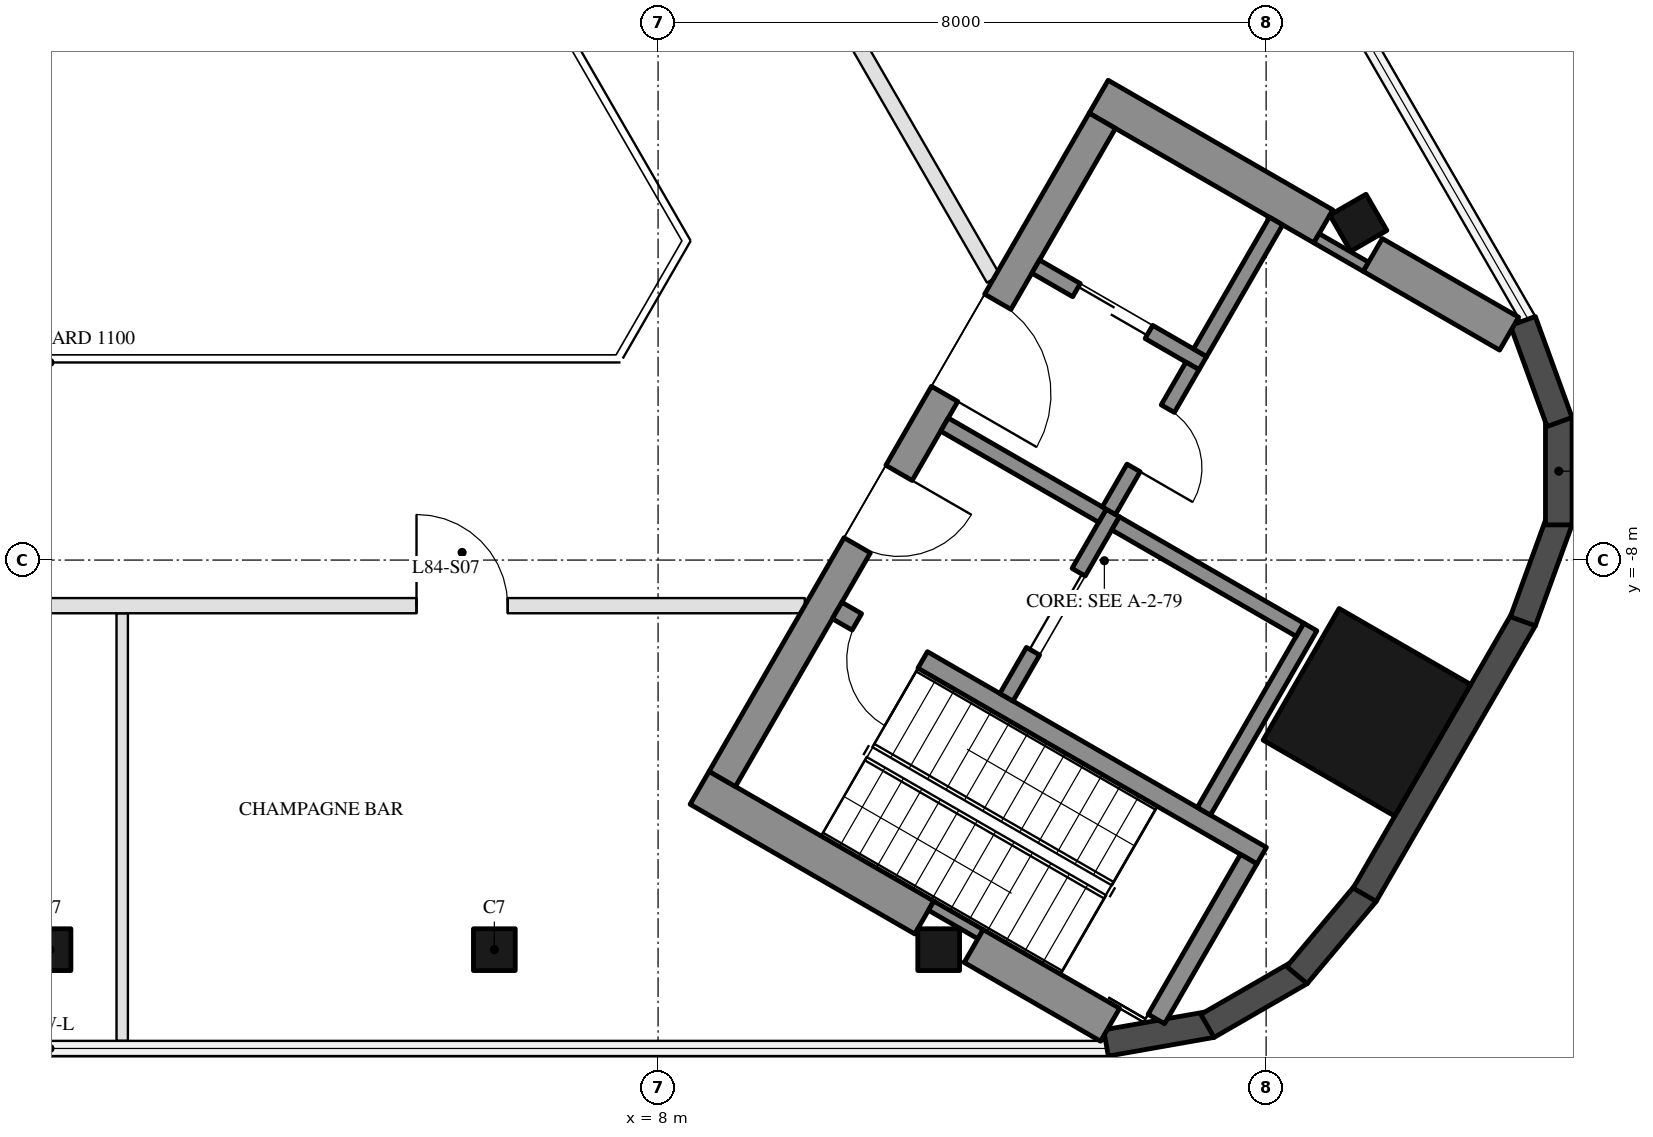
"""IFC4 building model, lengths in metres.
Left out: names, types, materials, properties, quantities, classifications, styles, units other than length and angle.
Written with IfcOpenShell. Run it as: python <this file> out.ifc"""

import sys

from ifc_helpers import new_model, si_unit, direction, frame, frame_2d, origin, origin_2d, place, context, subcontext, project, spatial, rectangle, hollow_rectangle, extrude, boolean, halfspace, element, fill, save


model = new_model("IFC4")
c1 = context("Model", 3, precision=1e-05, world=origin(), true_north=direction((0.0, 1.0)))
c2 = subcontext(c1, "Body", "Model", "MODEL_VIEW")
j1 = project(units=[si_unit("LENGTHUNIT", "METRE"), si_unit("PLANEANGLEUNIT", "RADIAN")], contexts=[c1])
p1 = place(None, origin())
s1 = spatial("IfcSite", under=j1, at=p1, CompositionType="ELEMENT")
p2 = place(p1, origin())
s2 = spatial("IfcBuilding", under=s1, at=p2, CompositionType="ELEMENT")
p3 = place(p2, frame((0.0, 0.0, 338.3)))
s3 = spatial("IfcBuildingStorey", under=s2, at=p3, CompositionType="ELEMENT", Elevation=338.3)
p4 = place(p3, frame((0.0, -13.126, 0.0), z_axis=(0.0, 0.0, 1.0), x_axis=(-1.0, 0.0, 0.0)))
e1 = element("IfcColumn", 1, at=p4, inside=s3, PredefinedType="COLUMN", context=c2, shape_type="SweptSolid", body=[
    boolean("DIFFERENCE", extrude(hollow_rectangle(XDim=0.55, YDim=0.55, WallThickness=0.025, at=origin_2d()), origin(), (0.0, 0.0, 1.0), 5.0), halfspace(frame((0.0, 0.0, 0.019), z_axis=(0.0, 0.0, 1.0), x_axis=(1.0, 0.0, 0.0)), True)),
])
p5 = place(p3, frame((5.846, -13.126, 0.0), z_axis=(0.0, 0.0, 1.0), x_axis=(-1.0, 0.0, 0.0)))
e2 = element("IfcColumn", 2, at=p5, inside=s3, PredefinedType="COLUMN", context=c2, shape_type="SweptSolid", body=[
    boolean("DIFFERENCE", extrude(hollow_rectangle(XDim=0.55, YDim=0.55, WallThickness=0.025, at=origin_2d()), origin(), (0.0, 0.0, 1.0), 5.0), halfspace(frame((0.0, 0.0, 0.02), z_axis=(0.0, 0.0, 1.0), x_axis=(1.0, 0.0, 0.0)), True)),
])
for number, where, z_axis, x_axis in (
    (3, (11.692, -13.126, 0.0), (0.0, 0.0, 1.0), (-1.0, 0.0, 0.0)),
    (4, (17.214, -3.562, 0.0), (0.0, 0.0, 1.0), (-0.5, 0.866, 0.0)),
):
    element("IfcColumn", number, at=place(p3, frame(where, z_axis=z_axis, x_axis=x_axis)), inside=s3, PredefinedType="COLUMN", context=c2, shape_type="SweptSolid", body=[
        boolean("DIFFERENCE", extrude(hollow_rectangle(XDim=0.55, YDim=0.55, WallThickness=0.025, at=origin_2d()), origin(), (0.0, 0.0, 1.0), 5.0), halfspace(frame((0.0, 0.0, 0.024), z_axis=(0.0, 0.0, 1.0), x_axis=(1.0, 0.0, 0.0)), True)),
    ])
p6 = place(p3, frame((17.326, -10.003, 0.0), z_axis=(0.0, 0.0, 1.0), x_axis=(0.5, 0.866025403784, 0.0)))
e5 = element("IfcColumn", 5, at=p6, inside=s3, PredefinedType="COLUMN", context=c2, shape_type="SweptSolid", body=[
    boolean("DIFFERENCE", extrude(hollow_rectangle(XDim=2.0, YDim=2.0, WallThickness=0.05, at=origin_2d()), origin(), (0.0, 0.0, 1.0), 5.0), halfspace(frame((0.0, 0.0, 0.066), z_axis=(0.0, 0.0, 1.0), x_axis=(1.0, 0.0, 0.0)), True)),
])
for number, where, z_axis, x_axis in (
    (6, (13.893, -14.354, 0.0), (0.0, 0.0, 1.0), (0.985, 0.174, 0.0)),
    (7, (15.228, -14.129, 0.0), (0.0, 0.0, 1.0), (0.866, 0.5, 0.0)),
    (8, (16.406, -13.461, 0.0), (0.0, 0.0, 1.0), (0.643, 0.766, 0.0)),
):
    element("IfcWall", number, at=place(p3, frame(where, z_axis=z_axis, x_axis=x_axis)), inside=s3, PredefinedType="SOLIDWALL", context=c2, shape_type="SweptSolid", body=[
        extrude(rectangle(XDim=1.414, YDim=0.35, at=frame_2d((0.707, 0.0))), origin(), (0.0, 0.0, 1.0), 4.8),
    ])
p7 = place(p3, frame((17.297, -12.404, 0.0), z_axis=(0.0, 0.0, 1.0), x_axis=(0.499983227221, 0.866035087336, 0.0)))
e9 = element("IfcWall", 9, at=p7, inside=s3, PredefinedType="SOLIDWALL", context=c2, shape_type="SweptSolid", body=[
    extrude(rectangle(XDim=4.187, YDim=0.35, at=frame_2d((2.094, 0.0))), origin(), (0.0, 0.0, 1.0), 4.8),
])
p8 = place(p3, frame((19.377, -8.805, 0.0), z_axis=(0.0, 0.0, 1.0), x_axis=(0.341964928618, 0.939712715459, 0.0)))
e10 = element("IfcWall", 10, at=p8, inside=s3, PredefinedType="SOLIDWALL", context=c2, shape_type="SweptSolid", body=[
    extrude(rectangle(XDim=1.414, YDim=0.35, at=frame_2d((0.707, 0.0))), origin(), (0.0, 0.0, 1.0), 4.8),
])
p9 = place(p3, frame((19.85, -7.537, 0.0), z_axis=(0.0, 0.0, 1.0), x_axis=(0.0, 1.0, 0.0)))
e11 = element("IfcWall", 11, at=p9, inside=s3, PredefinedType="SOLIDWALL", context=c2, shape_type="SweptSolid", body=[
    extrude(rectangle(XDim=1.413, YDim=0.35, at=frame_2d((0.707, 0.0))), origin(), (0.0, 0.0, 1.0), 4.8),
])
p10 = place(p3, frame((19.861, -6.183, 0.0), z_axis=(0.0, 0.0, 1.0), x_axis=(-0.341964928618, 0.939712715459, 0.0)))
e12 = element("IfcWall", 12, at=p10, inside=s3, PredefinedType="SOLIDWALL", context=c2, shape_type="SweptSolid", body=[
    extrude(rectangle(XDim=1.414, YDim=0.35, at=frame_2d((0.707, 0.0))), origin(), (0.0, 0.0, 1.0), 4.8),
])
p11 = place(p3, frame((8.547, -10.997, 0.0), z_axis=(0.0, 0.0, 1.0), x_axis=(0.866024775297, -0.500001088571, 0.0)))
e13 = element("IfcWall", 13, at=p11, inside=s3, PredefinedType="SHEAR", context=c2, shape_type="SweptSolid", body=[
    extrude(rectangle(XDim=3.413, YDim=0.5, at=frame_2d((1.707, 0.0))), origin(), (0.0, 0.0, 1.0), 4.8),
])
p12 = place(p3, frame((11.593, -12.547, 0.0), z_axis=(0.0, 0.0, 1.0), x_axis=(0.866115239748, -0.499844367254, 0.0)))
e14 = element("IfcWall", 14, at=p12, inside=s3, PredefinedType="SHEAR", context=c2, shape_type="SweptSolid", body=[
    extrude(rectangle(XDim=0.751, YDim=0.14, at=frame_2d((0.375, 0.0))), origin(), (0.0, 0.0, 1.0), 4.8),
])
p13 = place(p3, frame((12.153, -13.079, 0.0), z_axis=(0.0, 0.0, 1.0), x_axis=(0.866044274939, -0.499967312778, 0.0)))
e15 = element("IfcWall", 15, at=p13, inside=s3, PredefinedType="SHEAR", context=c2, shape_type="SweptSolid", body=[
    extrude(rectangle(XDim=2.072, YDim=0.5, at=frame_2d((1.036, 0.0))), origin(), (0.0, 0.0, 1.0), 4.8),
])
p14 = place(p3, frame((13.797, -1.903, 0.0), z_axis=(0.0, 0.0, 1.0), x_axis=(0.866024775297, -0.500001088571, 0.0)))
e16 = element("IfcWall", 16, at=p14, inside=s3, PredefinedType="SHEAR", context=c2, shape_type="SweptSolid", body=[
    extrude(rectangle(XDim=3.413, YDim=0.5, at=frame_2d((1.707, 0.0))), origin(), (0.0, 0.0, 1.0), 4.8),
])
p15 = place(p3, frame((16.663, -3.766, 0.0), z_axis=(0.0, 0.0, 1.0), x_axis=(0.86603400694, -0.499985098601, 0.0)))
e17 = element("IfcWall", 17, at=p15, inside=s3, PredefinedType="SHEAR", context=c2, shape_type="SweptSolid", body=[
    extrude(rectangle(XDim=0.751, YDim=0.14, at=frame_2d((0.375, 0.0))), origin(), (0.0, 0.0, 1.0), 4.8),
])
p16 = place(p3, frame((17.403, -3.986, 0.0), z_axis=(0.0, 0.0, 1.0), x_axis=(0.866044274939, -0.499967312778, 0.0)))
e18 = element("IfcWall", 18, at=p16, inside=s3, PredefinedType="SHEAR", context=c2, shape_type="SweptSolid", body=[
    extrude(rectangle(XDim=2.072, YDim=0.5, at=frame_2d((1.036, 0.0))), origin(), (0.0, 0.0, 1.0), 4.8),
])
p17 = place(p3, frame((8.845, -10.88, 0.0), z_axis=(0.0, 0.0, 1.0), x_axis=(0.500004234368, 0.866022959057, 0.0)))
e19 = element("IfcWall", 19, at=p17, inside=s3, PredefinedType="SHEAR", context=c2, shape_type="SweptSolid", body=[
    extrude(rectangle(XDim=10.0, YDim=0.4, at=frame_2d((5.0, 0.0))), origin(), (0.0, 0.0, 1.0), 4.8),
])
p18 = place(p17, frame((3.55, 0.0, 0.0)))
e20 = element("IfcOpeningElement", 20, at=p18, cuts=e19, PredefinedType="OPENING", context=c2, shape_type="SweptSolid", body=[
    extrude(rectangle(XDim=1.1, YDim=2.1, at=frame_2d((0.55, 1.05))), frame((0.0, 0.21, 0.0), z_axis=(0.0, -1.0, 0.0), x_axis=(1.0, 0.0, 0.0)), (0.0, 0.0, 1.0), 0.42),
])
p19 = place(p17, frame((5.85, 0.0, 0.0)))
e21 = element("IfcOpeningElement", 21, at=p19, cuts=e19, PredefinedType="OPENING", context=c2, shape_type="SweptSolid", body=[
    extrude(rectangle(XDim=1.4, YDim=2.1, at=frame_2d((0.7, 1.05))), frame((0.0, 0.21, 0.0), z_axis=(0.0, -1.0, 0.0), x_axis=(1.0, 0.0, 0.0)), (0.0, 0.0, 1.0), 0.42),
])
p20 = place(p3, frame((10.356, -8.664, 0.0), z_axis=(0.0, 0.0, 1.0), x_axis=(0.866028629588, -0.499994412703, 0.0)))
e22 = element("IfcWall", 22, at=p20, inside=s3, PredefinedType="SHEAR", context=c2, shape_type="SweptSolid", body=[
    extrude(rectangle(XDim=6.45, YDim=0.25, at=frame_2d((3.225, 0.0))), origin(), (0.0, 0.0, 1.0), 4.8),
])
p21 = place(p20, frame((0.3, 0.0, 0.0)))
e23 = element("IfcOpeningElement", 23, at=p21, cuts=e22, PredefinedType="OPENING", context=c2, shape_type="SweptSolid", body=[
    extrude(rectangle(XDim=1.0, YDim=2.1, at=frame_2d((0.5, 1.05))), frame((0.0, 0.135, 0.0), z_axis=(0.0, -1.0, 0.0), x_axis=(1.0, 0.0, 0.0)), (0.0, 0.0, 1.0), 0.27),
])
p22 = place(p3, frame((14.556, -14.039, 0.0), z_axis=(0.0, 0.0, 1.0), x_axis=(0.500018134935, 0.866014933322, 0.0)))
e24 = element("IfcWall", 24, at=p22, inside=s3, PredefinedType="SHEAR", context=c2, shape_type="SweptSolid", body=[
    extrude(rectangle(XDim=2.43, YDim=0.25, at=frame_2d((1.215, 0.0))), origin(), (0.0, 0.0, 1.0), 4.8),
])
p23 = place(p3, frame((15.181, -11.305, 0.0), z_axis=(0.0, 0.0, 1.0), x_axis=(0.49994636267, 0.866056369097, 0.0)))
e25 = element("IfcWall", 25, at=p23, inside=s3, PredefinedType="SHEAR", context=c2, shape_type="SweptSolid", body=[
    extrude(rectangle(XDim=2.8, YDim=0.2, at=frame_2d((1.4, 0.0))), origin(), (0.0, 0.0, 1.0), 4.8),
])
p24 = place(p3, frame((12.583, -9.805, 0.0), z_axis=(0.0, 0.0, 1.0), x_axis=(0.49994636267, 0.866056369097, 0.0)))
e26 = element("IfcWall", 26, at=p24, inside=s3, PredefinedType="SHEAR", context=c2, shape_type="SweptSolid", body=[
    extrude(rectangle(XDim=2.8, YDim=0.2, at=frame_2d((1.4, 0.0))), origin(), (0.0, 0.0, 1.0), 4.8),
])
p25 = place(p24, frame((0.7, 0.0, 0.0)))
e27 = element("IfcOpeningElement", 27, at=p25, cuts=e26, PredefinedType="OPENING", context=c2, shape_type="SweptSolid", body=[
    extrude(rectangle(XDim=1.2, YDim=2.1, at=frame_2d((0.6, 1.05))), frame((0.0, 0.11, 0.0), z_axis=(0.0, -1.0, 0.0), x_axis=(1.0, 0.0, 0.0)), (0.0, 0.0, 1.0), 0.22),
])
p26 = place(p3, frame((11.768, -6.217, 0.0), z_axis=(0.0, 0.0, 1.0), x_axis=(0.866050077142, -0.499957262057, 0.0)))
e28 = element("IfcWall", 28, at=p26, inside=s3, PredefinedType="SHEAR", context=c2, shape_type="SweptSolid", body=[
    extrude(rectangle(XDim=2.4, YDim=0.2, at=frame_2d((1.2, 0.0))), origin(), (0.0, 0.0, 1.0), 4.8),
])
p27 = place(p3, frame((14.02, -7.517, 0.0), z_axis=(0.0, 0.0, 1.0), x_axis=(0.866034573852, -0.49998411664, 0.0)))
e29 = element("IfcWall", 29, at=p27, inside=s3, PredefinedType="SHEAR", context=c2, shape_type="SweptSolid", body=[
    extrude(rectangle(XDim=2.8, YDim=0.2, at=frame_2d((1.4, 0.0))), origin(), (0.0, 0.0, 1.0), 4.8),
])
p28 = place(p3, frame((12.968, -4.138, 0.0), z_axis=(0.0, 0.0, 1.0), x_axis=(0.866022320763, -0.500005339912, 0.0)))
e30 = element("IfcWall", 30, at=p28, inside=s3, PredefinedType="SHEAR", context=c2, shape_type="SweptSolid", body=[
    extrude(rectangle(XDim=2.54, YDim=0.2, at=frame_2d((1.27, 0.0))), origin(), (0.0, 0.0, 1.0), 4.8),
])
p29 = place(p28, frame((0.62, 0.0, 0.0)))
e31 = element("IfcOpeningElement", 31, at=p29, cuts=e30, PredefinedType="OPENING", context=c2, shape_type="SweptSolid", body=[
    extrude(rectangle(XDim=1.1, YDim=2.1, at=frame_2d((0.55, 1.05))), frame((0.0, 0.11, 0.0), z_axis=(0.0, -1.0, 0.0), x_axis=(1.0, 0.0, 0.0)), (0.0, 0.0, 1.0), 0.22),
])
p30 = place(p3, frame((13.931, -7.35, 0.0), z_axis=(0.0, 0.0, 1.0), x_axis=(0.50002983664, 0.866008176907, 0.0)))
e32 = element("IfcWall", 32, at=p30, inside=s3, PredefinedType="SHEAR", context=c2, shape_type="SweptSolid", body=[
    extrude(rectangle(XDim=2.2, YDim=0.2, at=frame_2d((1.1, 0.0))), origin(), (0.0, 0.0, 1.0), 4.8),
])
p31 = place(p30, frame((0.65, 0.0, 0.0)))
e33 = element("IfcOpeningElement", 33, at=p31, cuts=e32, PredefinedType="OPENING", context=c2, shape_type="SweptSolid", body=[
    extrude(rectangle(XDim=0.9, YDim=2.1, at=frame_2d((0.45, 1.05))), frame((0.0, 0.11, 0.0), z_axis=(0.0, -1.0, 0.0), x_axis=(1.0, 0.0, 0.0)), (0.0, 0.0, 1.0), 0.22),
])
p32 = place(p3, frame((15.131, -5.272, 0.0), z_axis=(0.0, 0.0, 1.0), x_axis=(0.499972520799, 0.866041268327, 0.0)))
e34 = element("IfcWall", 34, at=p32, inside=s3, PredefinedType="SHEAR", context=c2, shape_type="SweptSolid", body=[
    extrude(rectangle(XDim=2.0, YDim=0.2, at=frame_2d((1.0, 0.0))), origin(), (0.0, 0.0, 1.0), 4.8),
])
p33 = place(p3, frame((0.95, -14.326, 0.0), z_axis=(0.0, 0.0, 1.0), x_axis=(0.0, 1.0, 0.0)))
e35 = element("IfcWall", 35, at=p33, inside=s3, PredefinedType="PARTITIONING", context=c2, shape_type="SweptSolid", body=[
    extrude(rectangle(XDim=5.626, YDim=0.15, at=frame_2d((2.813, 0.0))), origin(), (0.0, 0.0, 1.0), 4.41),
])
p34 = place(p3, frame((-9.93, -8.6, 0.0), z_axis=(0.0, 0.0, 1.0), x_axis=(1.0, 0.0, 0.0)))
e36 = element("IfcWall", 36, at=p34, inside=s3, PredefinedType="PARTITIONING", context=c2, shape_type="SweptSolid", body=[
    extrude(rectangle(XDim=19.861, YDim=0.2, at=frame_2d((9.93, 0.0))), origin(), (0.0, 0.0, 1.0), 4.4),
])
p35 = place(p34, frame((1.979, 0.0, 0.0)))
e37 = element("IfcOpeningElement", 37, at=p35, cuts=e36, PredefinedType="OPENING", context=c2, shape_type="SweptSolid", body=[
    extrude(rectangle(XDim=1.5, YDim=2.1, at=frame_2d((0.75, 1.05))), frame((0.0, 0.11, 0.0), z_axis=(0.0, -1.0, 0.0), x_axis=(1.0, 0.0, 0.0)), (0.0, 0.0, 1.0), 0.22),
])
p36 = place(p34, frame((7.438, 0.0, 0.0)))
e38 = element("IfcOpeningElement", 38, at=p36, cuts=e36, PredefinedType="OPENING", context=c2, shape_type="SweptSolid", body=[
    extrude(rectangle(XDim=1.5, YDim=2.1, at=frame_2d((0.75, 1.05))), frame((0.0, 0.11, 0.0), z_axis=(0.0, -1.0, 0.0), x_axis=(1.0, 0.0, 0.0)), (0.0, 0.0, 1.0), 0.22),
])
p37 = place(p34, frame((14.752, 0.0, 0.0)))
e39 = element("IfcOpeningElement", 39, at=p37, cuts=e36, PredefinedType="OPENING", context=c2, shape_type="SweptSolid", body=[
    extrude(rectangle(XDim=1.2, YDim=2.1, at=frame_2d((0.6, 1.05))), frame((0.0, 0.11, 0.0), z_axis=(0.0, -1.0, 0.0), x_axis=(1.0, 0.0, 0.0)), (0.0, 0.0, 1.0), 0.22),
])
p38 = place(p3, frame((12.413, -4.3, 0.0), z_axis=(0.0, 0.0, 1.0), x_axis=(-0.50000478328, 0.866022642139, 0.0)))
e40 = element("IfcWall", 40, at=p38, inside=s3, PredefinedType="PARTITIONING", context=c2, shape_type="SweptSolid", body=[
    extrude(rectangle(XDim=19.861, YDim=0.2, at=frame_2d((9.931, 0.0))), origin(), (0.0, 0.0, 1.0), 4.4),
])
p39 = place(p38, frame((4.384, 0.0, 0.0)))
e41 = element("IfcOpeningElement", 41, at=p39, cuts=e40, PredefinedType="OPENING", context=c2, shape_type="SweptSolid", body=[
    extrude(rectangle(XDim=1.2, YDim=2.1, at=frame_2d((0.6, 1.05))), frame((0.0, 0.11, 0.0), z_axis=(0.0, -1.0, 0.0), x_axis=(1.0, 0.0, 0.0)), (0.0, 0.0, 1.0), 0.22),
])
p40 = place(p38, frame((12.354, 0.0, 0.0)))
e42 = element("IfcOpeningElement", 42, at=p40, cuts=e40, PredefinedType="OPENING", context=c2, shape_type="SweptSolid", body=[
    extrude(rectangle(XDim=1.0, YDim=2.1, at=frame_2d((0.5, 1.05))), frame((0.0, 0.11, 0.0), z_axis=(0.0, -1.0, 0.0), x_axis=(1.0, 0.0, 0.0)), (0.0, 0.0, 1.0), 0.22),
])
p41 = place(p25, origin())
e43 = element("IfcDoor", 43, at=p41, inside=s3, OperationType="DOUBLE_DOOR_SLIDING", PredefinedType="DOOR", context=c2, shape_type="SweptSolid", body=[
    extrude(rectangle(XDim=1.2, YDim=2.1, at=frame_2d((0.6, 1.05))), frame((0.0, 0.025, 0.0), z_axis=(0.0, -1.0, 0.0), x_axis=(1.0, 0.0, 0.0)), (0.0, 0.0, 1.0), 0.05),
])
fill(e27, e43)
p42 = place(p29, origin())
e44 = element("IfcDoor", 44, at=p42, inside=s3, OperationType="DOUBLE_DOOR_SLIDING", PredefinedType="DOOR", context=c2, shape_type="SweptSolid", body=[
    extrude(rectangle(XDim=1.1, YDim=2.1, at=frame_2d((0.55, 1.05))), frame((0.0, 0.025, 0.0), z_axis=(0.0, -1.0, 0.0), x_axis=(1.0, 0.0, 0.0)), (0.0, 0.0, 1.0), 0.05),
])
fill(e31, e44)
p43 = place(p31, frame((0.9, 0.0, 0.0), z_axis=(0.0, 0.0, 1.0), x_axis=(-1.0, 0.0, 0.0)))
e45 = element("IfcDoor", 45, at=p43, inside=s3, OperationType="SINGLE_SWING_RIGHT", PredefinedType="DOOR", context=c2, shape_type="SweptSolid", body=[
    extrude(rectangle(XDim=0.9, YDim=2.1, at=frame_2d((0.45, 1.05))), frame((0.0, 0.025, 0.0), z_axis=(0.0, -1.0, 0.0), x_axis=(1.0, 0.0, 0.0)), (0.0, 0.0, 1.0), 0.05),
])
fill(e33, e45)
p44 = place(p18, frame((1.1, 0.0, 0.0), z_axis=(0.0, 0.0, 1.0), x_axis=(-1.0, 0.0, 0.0)))
e46 = element("IfcDoor", 46, at=p44, inside=s3, OperationType="SINGLE_SWING_LEFT", PredefinedType="DOOR", context=c2, shape_type="SweptSolid", body=[
    extrude(rectangle(XDim=1.1, YDim=2.1, at=frame_2d((0.55, 1.05))), frame((0.0, 0.025, 0.0), z_axis=(0.0, -1.0, 0.0), x_axis=(1.0, 0.0, 0.0)), (0.0, 0.0, 1.0), 0.05),
])
fill(e20, e46)
p45 = place(p19, frame((1.4, 0.0, 0.0), z_axis=(0.0, 0.0, 1.0), x_axis=(-1.0, 0.0, 0.0)))
e47 = element("IfcDoor", 47, at=p45, inside=s3, OperationType="DOUBLE_DOOR_SINGLE_SWING", PredefinedType="DOOR", context=c2, shape_type="SweptSolid", body=[
    extrude(rectangle(XDim=1.4, YDim=2.1, at=frame_2d((0.7, 1.05))), frame((0.0, 0.025, 0.0), z_axis=(0.0, -1.0, 0.0), x_axis=(1.0, 0.0, 0.0)), (0.0, 0.0, 1.0), 0.05),
])
fill(e21, e47)
p46 = place(p21, frame((1.0, 0.0, 0.0), z_axis=(0.0, 0.0, 1.0), x_axis=(-1.0, 0.0, 0.0)))
e48 = element("IfcDoor", 48, at=p46, inside=s3, OperationType="SINGLE_SWING_LEFT", PredefinedType="DOOR", context=c2, shape_type="SweptSolid", body=[
    extrude(rectangle(XDim=1.0, YDim=2.1, at=frame_2d((0.5, 1.05))), frame((0.0, 0.025, 0.0), z_axis=(0.0, -1.0, 0.0), x_axis=(1.0, 0.0, 0.0)), (0.0, 0.0, 1.0), 0.05),
])
fill(e23, e48)
p47 = place(p37, origin())
e49 = element("IfcDoor", 49, at=p47, inside=s3, OperationType="SINGLE_SWING_LEFT", PredefinedType="DOOR", context=c2, shape_type="SweptSolid", body=[
    extrude(rectangle(XDim=1.2, YDim=2.1, at=frame_2d((0.6, 1.05))), frame((0.0, 0.025, 0.0), z_axis=(0.0, -1.0, 0.0), x_axis=(1.0, 0.0, 0.0)), (0.0, 0.0, 1.0), 0.05),
])
fill(e39, e49)
save(model, sys.argv[1])
